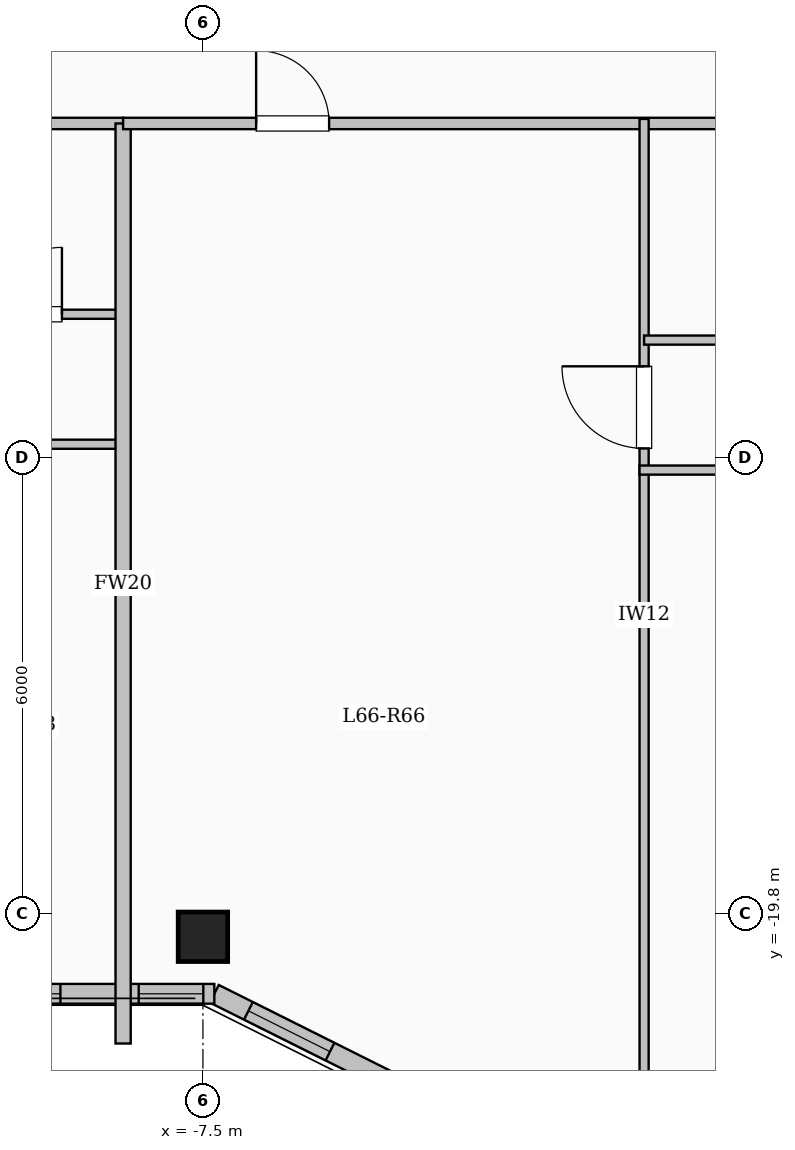
"""IFC4 building model, lengths in metres.
Left out: names, types, materials, properties, quantities, classifications, styles, units other than length and angle.
Written with IfcOpenShell. Run it as: python <this file> out.ifc"""

import sys

from ifc_helpers import new_model, si_unit, direction, frame, frame_2d, origin, origin_2d, place, context, subcontext, project, spatial, rectangle, extrude, element, fill, save


model = new_model("IFC4")
c1 = context("Model", 3, precision=1e-05, world=origin(), true_north=direction((0.0, 1.0)))
c2 = subcontext(c1, "Body", "Model", "MODEL_VIEW")
j1 = project(units=[si_unit("LENGTHUNIT", "METRE"), si_unit("PLANEANGLEUNIT", "RADIAN")], contexts=[c1])
p1 = place(None, origin())
s1 = spatial("IfcSite", under=j1, at=p1, CompositionType="ELEMENT")
p2 = place(p1, origin())
s2 = spatial("IfcBuilding", under=s1, at=p2, CompositionType="ELEMENT")
p3 = place(p2, frame((0.0, 0.0, 244.85)))
s3 = spatial("IfcBuildingStorey", under=s2, at=p3, CompositionType="ELEMENT", Elevation=244.85)
p4 = place(p3, frame((-7.5, -20.1, 0.0), z_axis=(0.0, 0.0, 1.0), x_axis=(1.0, 0.0, 0.0)))
e1 = element("IfcColumn", 1, at=p4, inside=s3, PredefinedType="COLUMN", context=c2, shape_type="SweptSolid", body=[
    extrude(rectangle(XDim=0.65, YDim=0.65, at=origin_2d()), origin(), (0.0, 0.0, 1.0), 3.35),
])
p5 = place(p3, frame((-4.35, -22.35, 0.0), z_axis=(0.0, 0.0, 1.0), x_axis=(-0.894427191, 0.4472135955, 0.0)))
e2 = element("IfcWall", 2, at=p5, inside=s3, PredefinedType="SOLIDWALL", context=c2, shape_type="SweptSolid", body=[
    extrude(rectangle(XDim=3.354, YDim=0.26, at=frame_2d((1.677, 0.0))), origin(), (0.0, 0.0, 1.0), 3.1),
])
p6 = place(p5, frame((1.653, 0.0, 0.95)))
e3 = element("IfcOpeningElement", 3, at=p6, cuts=e2, PredefinedType="OPENING", context=c2, shape_type="SweptSolid", body=[
    extrude(rectangle(XDim=1.2, YDim=1.5, at=frame_2d((0.6, 0.75))), frame((0.0, 0.14, 0.0), z_axis=(0.0, -1.0, 0.0), x_axis=(1.0, 0.0, 0.0)), (0.0, 0.0, 1.0), 0.28),
])
p7 = place(p3, frame((-7.35, -20.85, 0.0), z_axis=(0.0, 0.0, 1.0), x_axis=(-1.0, 0.0, 0.0)))
e4 = element("IfcWall", 4, at=p7, inside=s3, PredefinedType="SOLIDWALL", context=c2, shape_type="SweptSolid", body=[
    extrude(rectangle(XDim=10.5, YDim=0.26, at=frame_2d((5.25, 0.0))), origin(), (0.0, 0.0, 1.0), 3.1),
])
p8 = place(p7, frame((0.145, 0.0, 0.95)))
e5 = element("IfcOpeningElement", 5, at=p8, cuts=e4, PredefinedType="OPENING", context=c2, shape_type="SweptSolid", body=[
    extrude(rectangle(XDim=0.85, YDim=1.5, at=frame_2d((0.425, 0.75))), frame((0.0, 0.14, 0.0), z_axis=(0.0, -1.0, 0.0), x_axis=(1.0, 0.0, 0.0)), (0.0, 0.0, 1.0), 0.28),
])
p9 = place(p7, frame((2.025, 0.0, 0.95)))
e6 = element("IfcOpeningElement", 6, at=p9, cuts=e4, PredefinedType="OPENING", context=c2, shape_type="SweptSolid", body=[
    extrude(rectangle(XDim=1.2, YDim=1.5, at=frame_2d((0.6, 0.75))), frame((0.0, 0.14, 0.0), z_axis=(0.0, -1.0, 0.0), x_axis=(1.0, 0.0, 0.0)), (0.0, 0.0, 1.0), 0.28),
])
p10 = place(p7, frame((4.775, 0.0, 0.95)))
e7 = element("IfcOpeningElement", 7, at=p10, cuts=e4, PredefinedType="OPENING", context=c2, shape_type="SweptSolid", body=[
    extrude(rectangle(XDim=1.2, YDim=1.5, at=frame_2d((0.6, 0.75))), frame((0.0, 0.14, 0.0), z_axis=(0.0, -1.0, 0.0), x_axis=(1.0, 0.0, 0.0)), (0.0, 0.0, 1.0), 0.28),
])
p11 = place(p7, frame((7.75, 0.0, 0.9)))
e8 = element("IfcOpeningElement", 8, at=p11, cuts=e4, PredefinedType="OPENING", context=c2, shape_type="SweptSolid", body=[
    extrude(rectangle(XDim=1.65, YDim=1.6, at=frame_2d((0.825, 0.8))), frame((0.0, 0.14, 0.0), z_axis=(0.0, -1.0, 0.0), x_axis=(1.0, 0.0, 0.0)), (0.0, 0.0, 1.0), 0.28),
])
p12 = place(p3, frame((-17.75, -9.4, 0.0), z_axis=(0.0, 0.0, 1.0), x_axis=(1.0, 0.0, 0.0)))
e9 = element("IfcWall", 9, at=p12, inside=s3, PredefinedType="PARTITIONING", context=c2, shape_type="SweptSolid", body=[
    extrude(rectangle(XDim=9.2, YDim=0.15, at=frame_2d((4.6, 0.0))), origin(), (0.0, 0.0, 1.0), 3.1),
])
p13 = place(p12, frame((0.7, 0.0, 0.0)))
e10 = element("IfcOpeningElement", 10, at=p13, cuts=e9, PredefinedType="OPENING", context=c2, shape_type="SweptSolid", body=[
    extrude(rectangle(XDim=0.96, YDim=2.15, at=frame_2d((0.48, 1.075))), frame((0.0, 0.085, 0.0), z_axis=(0.0, -1.0, 0.0), x_axis=(1.0, 0.0, 0.0)), (0.0, 0.0, 1.0), 0.17),
])
p14 = place(p3, frame((-10.99, -11.91, 0.0), z_axis=(0.0, 0.0, 1.0), x_axis=(1.0, 0.0, 0.0)))
e11 = element("IfcWall", 11, at=p14, inside=s3, PredefinedType="PARTITIONING", context=c2, shape_type="SweptSolid", body=[
    extrude(rectangle(XDim=2.39, YDim=0.12, at=frame_2d((1.195, 0.0))), origin(), (0.0, 0.0, 1.0), 3.1),
])
p15 = place(p14, frame((0.755, 0.0, 0.0)))
e12 = element("IfcOpeningElement", 12, at=p15, cuts=e11, PredefinedType="OPENING", context=c2, shape_type="SweptSolid", body=[
    extrude(rectangle(XDim=0.88, YDim=2.1, at=frame_2d((0.44, 1.05))), frame((0.0, 0.07, 0.0), z_axis=(0.0, -1.0, 0.0), x_axis=(1.0, 0.0, 0.0)), (0.0, 0.0, 1.0), 0.14),
])
p16 = place(p3, frame((-14.138, -13.62, 0.0), z_axis=(0.0, 0.0, 1.0), x_axis=(1.0, 0.0, 0.0)))
e13 = element("IfcWall", 13, at=p16, inside=s3, PredefinedType="PARTITIONING", context=c2, shape_type="SweptSolid", body=[
    extrude(rectangle(XDim=5.598, YDim=0.12, at=frame_2d((2.799, 0.0))), origin(), (0.0, 0.0, 1.0), 3.1),
])
p17 = place(p16, frame((0.914, 0.0, 0.0)))
e14 = element("IfcOpeningElement", 14, at=p17, cuts=e13, PredefinedType="OPENING", context=c2, shape_type="SweptSolid", body=[
    extrude(rectangle(XDim=0.88, YDim=2.1, at=frame_2d((0.44, 1.05))), frame((0.0, 0.07, 0.0), z_axis=(0.0, -1.0, 0.0), x_axis=(1.0, 0.0, 0.0)), (0.0, 0.0, 1.0), 0.14),
])
p18 = place(p16, frame((3.623, 0.0, 0.0)))
e15 = element("IfcOpeningElement", 15, at=p18, cuts=e13, PredefinedType="OPENING", context=c2, shape_type="SweptSolid", body=[
    extrude(rectangle(XDim=0.88, YDim=2.1, at=frame_2d((0.44, 1.05))), frame((0.0, 0.07, 0.0), z_axis=(0.0, -1.0, 0.0), x_axis=(1.0, 0.0, 0.0)), (0.0, 0.0, 1.0), 0.14),
])
p19 = place(p3, frame((-8.55, -21.504, 0.0), z_axis=(0.0, 0.0, 1.0), x_axis=(0.0, 1.0, 0.0)))
e16 = element("IfcWall", 16, at=p19, inside=s3, PredefinedType="SOLIDWALL", context=c2, shape_type="SweptSolid", body=[
    extrude(rectangle(XDim=12.104, YDim=0.2, at=frame_2d((6.052, 0.0))), origin(), (0.0, 0.0, 1.0), 3.1),
])
p20 = place(p3, frame((-8.55, -9.4, 0.0), z_axis=(0.0, 0.0, 1.0), x_axis=(1.0, 0.0, 0.0)))
e17 = element("IfcWall", 17, at=p20, inside=s3, PredefinedType="PARTITIONING", context=c2, shape_type="SweptSolid", body=[
    extrude(rectangle(XDim=17.1, YDim=0.15, at=frame_2d((8.55, 0.0))), origin(), (0.0, 0.0, 1.0), 3.1),
])
p21 = place(p20, frame((1.75, 0.0, 0.0)))
e18 = element("IfcOpeningElement", 18, at=p21, cuts=e17, PredefinedType="OPENING", context=c2, shape_type="SweptSolid", body=[
    extrude(rectangle(XDim=0.96, YDim=2.15, at=frame_2d((0.48, 1.075))), frame((0.0, 0.085, 0.0), z_axis=(0.0, -1.0, 0.0), x_axis=(1.0, 0.0, 0.0)), (0.0, 0.0, 1.0), 0.17),
])
p22 = place(p3, frame((-1.696, -22.38, 0.0), z_axis=(0.0, 0.0, 1.0), x_axis=(0.0, 1.0, 0.0)))
e19 = element("IfcWall", 19, at=p22, inside=s3, PredefinedType="PARTITIONING", context=c2, shape_type="SweptSolid", body=[
    extrude(rectangle(XDim=13.04, YDim=0.12, at=frame_2d((6.52, 0.0))), origin(), (0.0, 0.0, 1.0), 3.1),
])
p23 = place(p22, frame((8.705, 0.0, 0.0)))
e20 = element("IfcOpeningElement", 20, at=p23, cuts=e19, PredefinedType="OPENING", context=c2, shape_type="SweptSolid", body=[
    extrude(rectangle(XDim=1.08, YDim=2.15, at=frame_2d((0.54, 1.075))), frame((0.0, 0.07, 0.0), z_axis=(0.0, -1.0, 0.0), x_axis=(1.0, 0.0, 0.0)), (0.0, 0.0, 1.0), 0.14),
])
p24 = place(p3, frame((-1.696, -12.25, 0.0), z_axis=(0.0, 0.0, 1.0), x_axis=(1.0, 0.0, 0.0)))
e21 = element("IfcWall", 21, at=p24, inside=s3, PredefinedType="PARTITIONING", context=c2, shape_type="SweptSolid", body=[
    extrude(rectangle(XDim=5.393, YDim=0.12, at=frame_2d((2.697, 0.0))), origin(), (0.0, 0.0, 1.0), 2.785),
])
p25 = place(p24, frame((2.256, 0.0, 0.0)))
e22 = element("IfcOpeningElement", 22, at=p25, cuts=e21, PredefinedType="OPENING", context=c2, shape_type="SweptSolid", body=[
    extrude(rectangle(XDim=0.88, YDim=2.1, at=frame_2d((0.44, 1.05))), frame((0.0, 0.07, 0.0), z_axis=(0.0, -1.0, 0.0), x_axis=(1.0, 0.0, 0.0)), (0.0, 0.0, 1.0), 0.14),
])
p26 = place(p3, frame((-1.756, -13.96, 0.0), z_axis=(0.0, 0.0, 1.0), x_axis=(1.0, 0.0, 0.0)))
e23 = element("IfcWall", 23, at=p26, inside=s3, PredefinedType="PARTITIONING", context=c2, shape_type="SweptSolid", body=[
    extrude(rectangle(XDim=10.366, YDim=0.12, at=frame_2d((5.183, 0.0))), origin(), (0.0, 0.0, 1.0), 2.785),
])
p27 = place(p26, frame((1.256, 0.0, 0.0)))
e24 = element("IfcOpeningElement", 24, at=p27, cuts=e23, PredefinedType="OPENING", context=c2, shape_type="SweptSolid", body=[
    extrude(rectangle(XDim=0.88, YDim=2.1, at=frame_2d((0.44, 1.05))), frame((0.0, 0.07, 0.0), z_axis=(0.0, -1.0, 0.0), x_axis=(1.0, 0.0, 0.0)), (0.0, 0.0, 1.0), 0.14),
])
p28 = place(p26, frame((4.648, 0.0, 0.0)))
e25 = element("IfcOpeningElement", 25, at=p28, cuts=e23, PredefinedType="OPENING", context=c2, shape_type="SweptSolid", body=[
    extrude(rectangle(XDim=0.88, YDim=2.1, at=frame_2d((0.44, 1.05))), frame((0.0, 0.07, 0.0), z_axis=(0.0, -1.0, 0.0), x_axis=(1.0, 0.0, 0.0)), (0.0, 0.0, 1.0), 0.14),
])
p29 = place(p26, frame((8.04, 0.0, 0.0)))
e26 = element("IfcOpeningElement", 26, at=p29, cuts=e23, PredefinedType="OPENING", context=c2, shape_type="SweptSolid", body=[
    extrude(rectangle(XDim=0.88, YDim=2.1, at=frame_2d((0.44, 1.05))), frame((0.0, 0.07, 0.0), z_axis=(0.0, -1.0, 0.0), x_axis=(1.0, 0.0, 0.0)), (0.0, 0.0, 1.0), 0.14),
])
p30 = place(p6, origin())
e27 = element("IfcWindow", 27, at=p30, inside=s3, PartitioningType="SINGLE_PANEL", PredefinedType="WINDOW", context=c2, shape_type="SweptSolid", body=[
    extrude(rectangle(XDim=1.2, YDim=1.5, at=frame_2d((0.6, 0.75))), frame((0.0, 0.03, 0.0), z_axis=(0.0, -1.0, 0.0), x_axis=(1.0, 0.0, 0.0)), (0.0, 0.0, 1.0), 0.06),
])
fill(e3, e27)
p31 = place(p8, origin())
e28 = element("IfcWindow", 28, at=p31, inside=s3, PartitioningType="SINGLE_PANEL", PredefinedType="WINDOW", context=c2, shape_type="SweptSolid", body=[
    extrude(rectangle(XDim=0.85, YDim=1.5, at=frame_2d((0.425, 0.75))), frame((0.0, 0.03, 0.0), z_axis=(0.0, -1.0, 0.0), x_axis=(1.0, 0.0, 0.0)), (0.0, 0.0, 1.0), 0.06),
])
fill(e5, e28)
p32 = place(p9, origin())
e29 = element("IfcWindow", 29, at=p32, inside=s3, PartitioningType="SINGLE_PANEL", PredefinedType="WINDOW", context=c2, shape_type="SweptSolid", body=[
    extrude(rectangle(XDim=1.2, YDim=1.5, at=frame_2d((0.6, 0.75))), frame((0.0, 0.03, 0.0), z_axis=(0.0, -1.0, 0.0), x_axis=(1.0, 0.0, 0.0)), (0.0, 0.0, 1.0), 0.06),
])
fill(e6, e29)
p33 = place(p15, origin())
e30 = element("IfcDoor", 30, at=p33, inside=s3, OperationType="SINGLE_SWING_RIGHT", PredefinedType="DOOR", context=c2, shape_type="SweptSolid", body=[
    extrude(rectangle(XDim=0.88, YDim=2.1, at=frame_2d((0.44, 1.05))), frame((0.0, 0.025, 0.0), z_axis=(0.0, -1.0, 0.0), x_axis=(1.0, 0.0, 0.0)), (0.0, 0.0, 1.0), 0.05),
])
fill(e12, e30)
p34 = place(p21, origin())
e31 = element("IfcDoor", 31, at=p34, inside=s3, OperationType="SINGLE_SWING_LEFT", PredefinedType="DOOR", context=c2, shape_type="SweptSolid", body=[
    extrude(rectangle(XDim=0.96, YDim=2.15, at=frame_2d((0.48, 1.075))), frame((0.0, 0.025, 0.0), z_axis=(0.0, -1.0, 0.0), x_axis=(1.0, 0.0, 0.0)), (0.0, 0.0, 1.0), 0.05),
])
fill(e18, e31)
p35 = place(p23, origin())
e32 = element("IfcDoor", 32, at=p35, inside=s3, OperationType="SINGLE_SWING_RIGHT", PredefinedType="DOOR", context=c2, shape_type="SweptSolid", body=[
    extrude(rectangle(XDim=1.08, YDim=2.15, at=frame_2d((0.54, 1.075))), frame((0.0, 0.025, 0.0), z_axis=(0.0, -1.0, 0.0), x_axis=(1.0, 0.0, 0.0)), (0.0, 0.0, 1.0), 0.05),
])
fill(e20, e32)
save(model, sys.argv[1])
